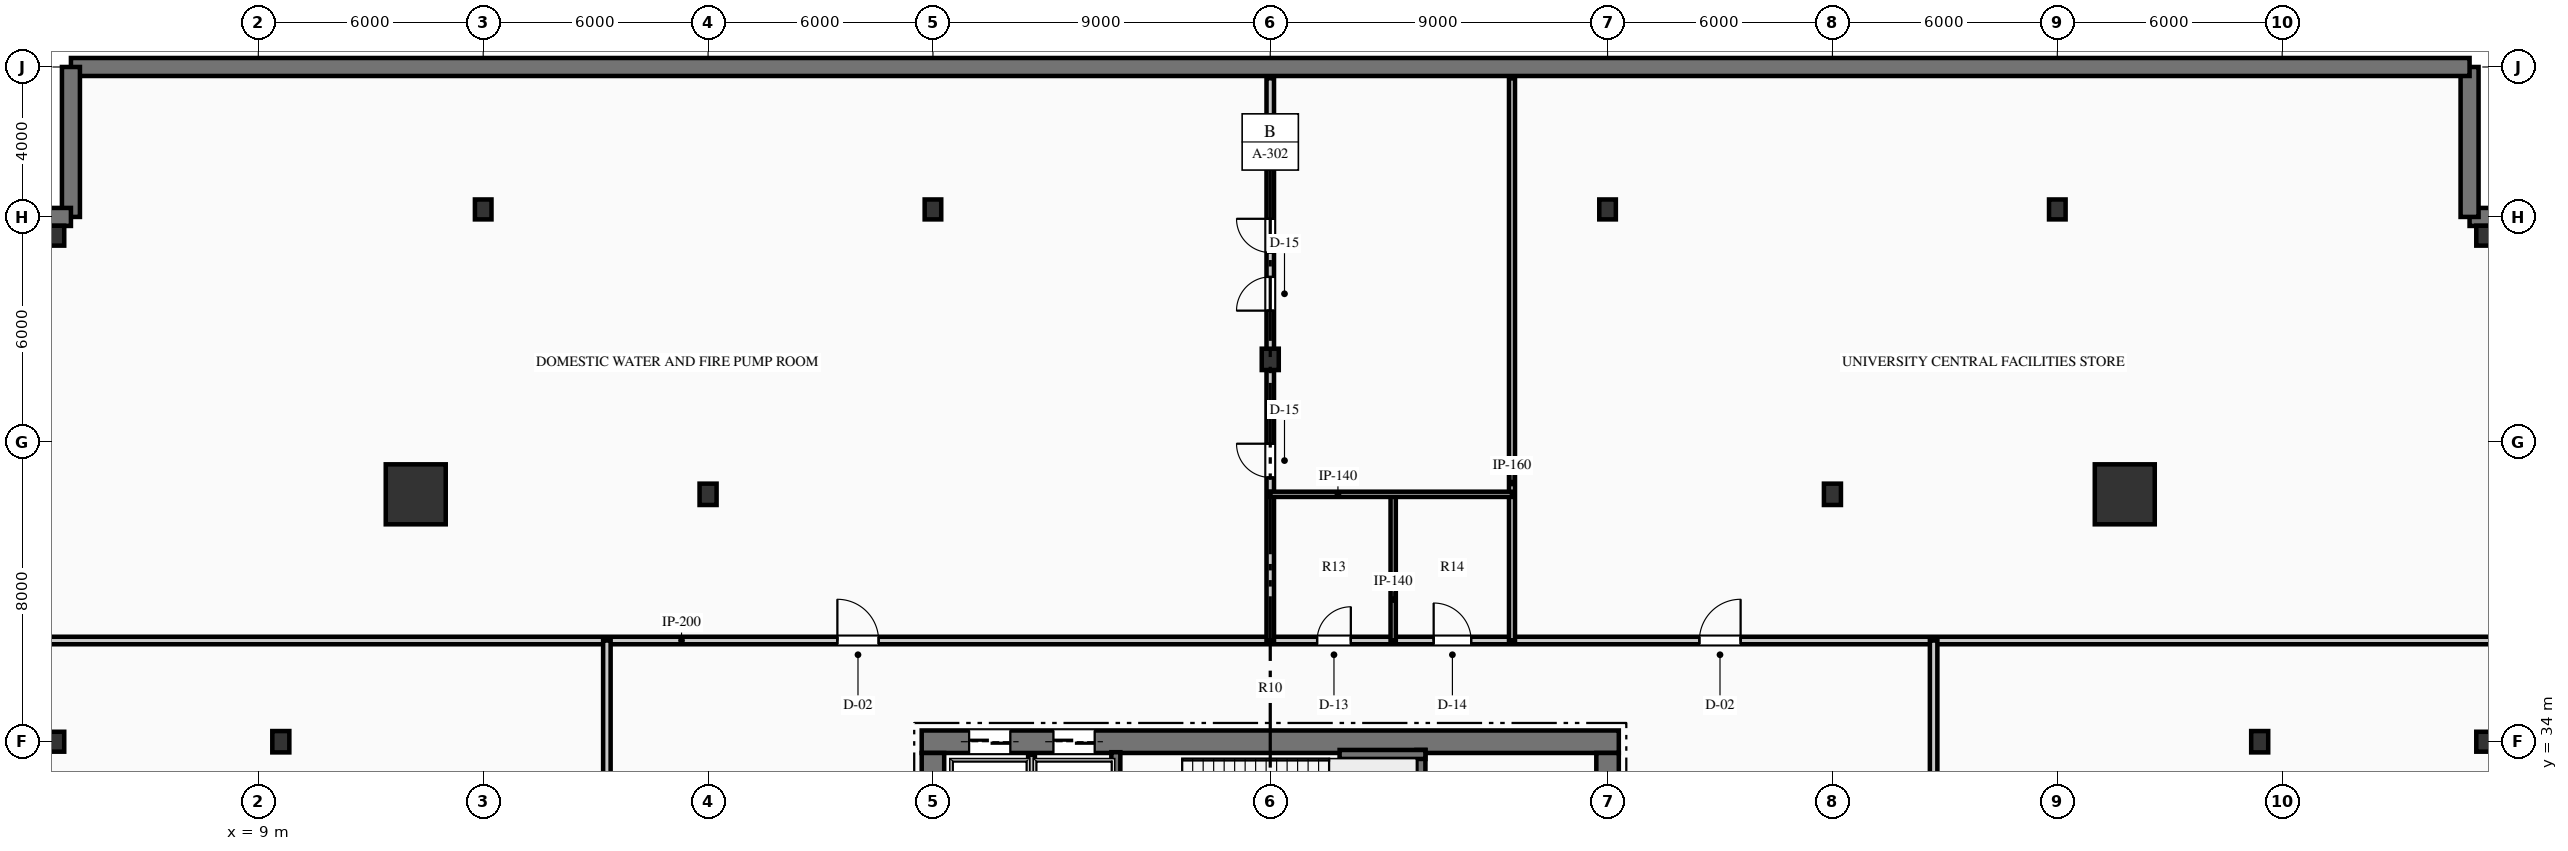
"""IFC4 building model, lengths in metres.
Left out: names, types, materials, properties, quantities, classifications, styles, units other than length and angle.
Written with IfcOpenShell. Run it as: python <this file> out.ifc"""

import sys

from ifc_helpers import new_model, si_unit, direction, frame, frame_2d, origin, origin_2d, place, context, subcontext, project, spatial, rectangle, hollow_rectangle, i_section, extrude, element, fill, save


model = new_model("IFC4")
c1 = context("Model", 3, precision=1e-05, world=origin(), true_north=direction((0.0, 1.0)))
c2 = subcontext(c1, "Body", "Model", "MODEL_VIEW")
j1 = project(units=[si_unit("LENGTHUNIT", "METRE"), si_unit("PLANEANGLEUNIT", "RADIAN")], contexts=[c1])
p1 = place(None, origin())
s1 = spatial("IfcSite", under=j1, at=p1, CompositionType="ELEMENT")
p2 = place(p1, origin())
s2 = spatial("IfcBuilding", under=s1, at=p2, CompositionType="ELEMENT")
p3 = place(p2, frame((0.0, 0.0, -5.2)))
s3 = spatial("IfcBuildingStorey", under=s2, at=p3, CompositionType="ELEMENT", Elevation=-5.2)
p4 = place(p3, frame((26.7, 34.0, -0.3), z_axis=(0.0, 0.0, 1.0), x_axis=(1.0, 0.0, 0.0)))
e1 = element("IfcWall", 1, at=p4, inside=s3, PredefinedType="SHEAR", context=c2, shape_type="SweptSolid", body=[
    extrude(rectangle(XDim=18.6, YDim=0.6, at=frame_2d((9.3, 0.0))), origin(), (0.0, 0.0, 1.0), 5.5),
])
p5 = place(p4, frame((1.265, 0.0, 0.3)))
e2 = element("IfcOpeningElement", 2, at=p5, cuts=e1, PredefinedType="OPENING", context=c2, shape_type="SweptSolid", body=[
    extrude(rectangle(XDim=1.1, YDim=2.15, at=frame_2d((0.55, 1.075))), frame((0.0, 0.31, 0.0), z_axis=(0.0, -1.0, 0.0), x_axis=(1.0, 0.0, 0.0)), (0.0, 0.0, 1.0), 0.62),
])
p6 = place(p4, frame((3.515, 0.0, 0.3)))
e3 = element("IfcOpeningElement", 3, at=p6, cuts=e1, PredefinedType="OPENING", context=c2, shape_type="SweptSolid", body=[
    extrude(rectangle(XDim=1.1, YDim=2.15, at=frame_2d((0.55, 1.075))), frame((0.0, 0.31, 0.0), z_axis=(0.0, -1.0, 0.0), x_axis=(1.0, 0.0, 0.0)), (0.0, 0.0, 1.0), 0.62),
])
p7 = place(p3, frame((27.0, 18.3, -0.3), z_axis=(0.0, 0.0, 1.0), x_axis=(0.0, 1.0, 0.0)))
e4 = element("IfcWall", 4, at=p7, inside=s3, PredefinedType="SHEAR", context=c2, shape_type="SweptSolid", body=[
    extrude(rectangle(XDim=15.4, YDim=0.6, at=frame_2d((7.7, 0.0))), origin(), (0.0, 0.0, 1.0), 5.5),
])
p8 = place(p7, frame((9.94, 0.0, 0.3)))
e5 = element("IfcOpeningElement", 5, at=p8, cuts=e4, PredefinedType="OPENING", context=c2, shape_type="SweptSolid", body=[
    extrude(rectangle(XDim=1.4, YDim=2.2, at=frame_2d((0.7, 1.1))), frame((0.0, 0.31, 0.0), z_axis=(0.0, -1.0, 0.0), x_axis=(1.0, 0.0, 0.0)), (0.0, 0.0, 1.0), 0.62),
])
p9 = place(p3, frame((45.0, 18.3, -0.3), z_axis=(0.0, 0.0, 1.0), x_axis=(0.0, 1.0, 0.0)))
e6 = element("IfcWall", 6, at=p9, inside=s3, PredefinedType="SHEAR", context=c2, shape_type="SweptSolid", body=[
    extrude(rectangle(XDim=15.4, YDim=0.6, at=frame_2d((7.7, 0.0))), origin(), (0.0, 0.0, 1.0), 5.5),
])
p10 = place(p9, frame((9.94, 0.0, 0.3)))
e7 = element("IfcOpeningElement", 7, at=p10, cuts=e6, PredefinedType="OPENING", context=c2, shape_type="SweptSolid", body=[
    extrude(rectangle(XDim=1.4, YDim=2.2, at=frame_2d((0.7, 1.1))), frame((0.0, 0.31, 0.0), z_axis=(0.0, -1.0, 0.0), x_axis=(1.0, 0.0, 0.0)), (0.0, 0.0, 1.0), 0.62),
])
p11 = place(p3, frame((31.88, 29.93, -0.3), z_axis=(0.0, 0.0, 1.0), x_axis=(0.0, 1.0, 0.0)))
e8 = element("IfcWall", 8, at=p11, inside=s3, PredefinedType="SHEAR", context=c2, shape_type="SweptSolid", body=[
    extrude(rectangle(XDim=3.79, YDim=0.24, at=frame_2d((1.895, 0.0))), origin(), (0.0, 0.0, 1.0), 5.5),
])
p12 = place(p3, frame((40.02, 29.93, -0.3), z_axis=(0.0, 0.0, 1.0), x_axis=(0.0, 1.0, 0.0)))
e9 = element("IfcWall", 9, at=p12, inside=s3, PredefinedType="SHEAR", context=c2, shape_type="SweptSolid", body=[
    extrude(rectangle(XDim=3.85, YDim=0.24, at=frame_2d((1.925, 0.0))), origin(), (0.0, 0.0, 1.0), 5.5),
])
p13 = place(p3, frame((37.85, 33.66, -0.3), z_axis=(0.0, 0.0, 1.0), x_axis=(1.0, 0.0, 0.0)))
e10 = element("IfcWall", 10, at=p13, inside=s3, PredefinedType="SHEAR", context=c2, shape_type="SweptSolid", body=[
    extrude(rectangle(XDim=2.29, YDim=0.24, at=frame_2d((1.145, 0.0))), origin(), (0.0, 0.0, 1.0), 5.5),
])
for number, where, z_axis, x_axis in (
    (11, (72.0, 48.0, -0.3), (0.0, 0.0, 1.0), (-1.0, 0.0, 0.0)),
    (12, (68.0, 48.0, -0.3), (0.0, 0.0, 1.0), (0.0, 1.0, 0.0)),
):
    element("IfcWall", number, at=place(p3, frame(where, z_axis=z_axis, x_axis=x_axis)), inside=s3, PredefinedType="SHEAR", context=c2, shape_type="SweptSolid", body=[
        extrude(rectangle(XDim=4.0, YDim=0.48, at=frame_2d((2.0, 0.0))), origin(), (0.0, 0.0, 1.0), 5.5),
    ])
p14 = place(p3, frame((68.0, 52.0, -0.3), z_axis=(0.0, 0.0, 1.0), x_axis=(-1.0, 0.0, 0.0)))
e13 = element("IfcWall", 13, at=p14, inside=s3, PredefinedType="SHEAR", context=c2, shape_type="SweptSolid", body=[
    extrude(rectangle(XDim=64.0, YDim=0.48, at=frame_2d((32.0, 0.0))), origin(), (0.0, 0.0, 1.0), 5.5),
])
for number, where, z_axis, x_axis in (
    (14, (4.0, 52.0, -0.3), (0.0, 0.0, 1.0), (0.0, -1.0, 0.0)),
    (15, (4.0, 48.0, -0.3), (0.0, 0.0, 1.0), (-1.0, 0.0, 0.0)),
):
    element("IfcWall", number, at=place(p3, frame(where, z_axis=z_axis, x_axis=x_axis)), inside=s3, PredefinedType="SHEAR", context=c2, shape_type="SweptSolid", body=[
        extrude(rectangle(XDim=4.0, YDim=0.48, at=frame_2d((2.0, 0.0))), origin(), (0.0, 0.0, 1.0), 5.5),
    ])
for number, where, z_axis, x_axis in (
    (16, (58.8, 40.6, -0.3), (0.0, 0.0, 1.0), (1.0, 0.0, 0.0)),
    (17, (13.2, 40.6, -0.3), (0.0, 0.0, 1.0), (1.0, 0.0, 0.0)),
):
    element("IfcColumn", number, at=place(p3, frame(where, z_axis=z_axis, x_axis=x_axis)), inside=s3, PredefinedType="COLUMN", context=c2, shape_type="SweptSolid", body=[
        extrude(hollow_rectangle(XDim=1.6, YDim=1.6, WallThickness=0.08, at=origin_2d()), origin(), (0.0, 0.0, 1.0), 5.5),
    ])
for number, where, z_axis, x_axis in (
    (18, (9.6, 34.0, -0.3), (0.0, 0.0, 1.0), (1.0, 0.0, 0.0)),
    (19, (62.4, 34.0, -0.3), (0.0, 0.0, 1.0), (1.0, 0.0, 0.0)),
    (20, (21.0, 40.6, -0.3), (0.0, 0.0, 1.0), (1.0, 0.0, 0.0)),
    (21, (51.0, 40.6, -0.3), (0.0, 0.0, 1.0), (1.0, 0.0, 0.0)),
    (22, (36.0, 44.2, -0.3), (0.0, 0.0, 1.0), (1.0, 0.0, 0.0)),
):
    element("IfcColumn", number, at=place(p3, frame(where, z_axis=z_axis, x_axis=x_axis)), inside=s3, PredefinedType="COLUMN", context=c2, shape_type="SweptSolid", body=[
        extrude(i_section(OverallWidth=0.454, OverallDepth=0.569, WebThickness=0.078, FlangeThickness=0.125, at=origin_2d()), origin(), (0.0, 0.0, 1.0), 5.5),
    ])
for number, where, z_axis, x_axis in (
    (23, (3.6, 34.0, -0.3), (0.0, 0.0, 1.0), (1.0, 0.0, 0.0)),
    (24, (3.6, 47.5, -0.3), (0.0, 0.0, 1.0), (1.0, 0.0, 0.0)),
    (25, (68.4, 34.0, -0.3), (0.0, 0.0, 1.0), (1.0, 0.0, 0.0)),
    (26, (68.4, 47.5, -0.3), (0.0, 0.0, 1.0), (1.0, 0.0, 0.0)),
    (27, (57.0, 48.2, -0.3), (0.0, 0.0, 1.0), (1.0, 0.0, 0.0)),
    (28, (45.0, 48.2, -0.3), (0.0, 0.0, 1.0), (1.0, 0.0, 0.0)),
    (29, (27.0, 48.2, -0.3), (0.0, 0.0, 1.0), (1.0, 0.0, 0.0)),
    (30, (15.0, 48.2, -0.3), (0.0, 0.0, 1.0), (1.0, 0.0, 0.0)),
):
    element("IfcColumn", number, at=place(p3, frame(where, z_axis=z_axis, x_axis=x_axis)), inside=s3, PredefinedType="COLUMN", context=c2, shape_type="SweptSolid", body=[
        extrude(i_section(OverallWidth=0.442, OverallDepth=0.531, WebThickness=0.066, FlangeThickness=0.106, at=origin_2d()), origin(), (0.0, 0.0, 1.0), 5.5),
    ])
p15 = place(p3, frame((29.63, 29.9, 0.0), z_axis=(0.0, 0.0, 1.0), x_axis=(0.0, 1.0, 0.0)))
e31 = element("IfcWall", 31, at=p15, inside=s3, PredefinedType="PARTITIONING", context=c2, shape_type="SweptSolid", body=[
    extrude(rectangle(XDim=3.75, YDim=0.18, at=frame_2d((1.875, 0.0))), origin(), (0.0, 0.0, 1.0), 4.84),
])
p16 = place(p3, frame((0.3, 36.7, 0.0), z_axis=(0.0, 0.0, 1.0), x_axis=(1.0, 0.0, 0.0)))
e32 = element("IfcWall", 32, at=p16, inside=s3, PredefinedType="PARTITIONING", context=c2, shape_type="SweptSolid", body=[
    extrude(rectangle(XDim=71.4, YDim=0.2, at=frame_2d((35.7, 0.0))), origin(), (0.0, 0.0, 1.0), 4.84),
])
p17 = place(p16, frame((24.15, 0.0, 0.0)))
e33 = element("IfcOpeningElement", 33, at=p17, cuts=e32, PredefinedType="OPENING", context=c2, shape_type="SweptSolid", body=[
    extrude(rectangle(XDim=1.1, YDim=2.15, at=frame_2d((0.55, 1.075))), frame((0.0, 0.11, 0.0), z_axis=(0.0, -1.0, 0.0), x_axis=(1.0, 0.0, 0.0)), (0.0, 0.0, 1.0), 0.22),
])
p18 = place(p16, frame((36.95, 0.0, 0.0)))
e34 = element("IfcOpeningElement", 34, at=p18, cuts=e32, PredefinedType="OPENING", context=c2, shape_type="SweptSolid", body=[
    extrude(rectangle(XDim=0.9, YDim=2.15, at=frame_2d((0.45, 1.075))), frame((0.0, 0.11, 0.0), z_axis=(0.0, -1.0, 0.0), x_axis=(1.0, 0.0, 0.0)), (0.0, 0.0, 1.0), 0.22),
])
p19 = place(p16, frame((40.06, 0.0, 0.0)))
e35 = element("IfcOpeningElement", 35, at=p19, cuts=e32, PredefinedType="OPENING", context=c2, shape_type="SweptSolid", body=[
    extrude(rectangle(XDim=1.0, YDim=2.15, at=frame_2d((0.5, 1.075))), frame((0.0, 0.11, 0.0), z_axis=(0.0, -1.0, 0.0), x_axis=(1.0, 0.0, 0.0)), (0.0, 0.0, 1.0), 0.22),
])
p20 = place(p16, frame((47.15, 0.0, 0.0)))
e36 = element("IfcOpeningElement", 36, at=p20, cuts=e32, PredefinedType="OPENING", context=c2, shape_type="SweptSolid", body=[
    extrude(rectangle(XDim=1.1, YDim=2.15, at=frame_2d((0.55, 1.075))), frame((0.0, 0.11, 0.0), z_axis=(0.0, -1.0, 0.0), x_axis=(1.0, 0.0, 0.0)), (0.0, 0.0, 1.0), 0.22),
])
for number, where, z_axis, x_axis in (
    (37, (18.3, 30.08, 0.0), (0.0, 0.0, 1.0), (0.0, 1.0, 0.0)),
    (38, (53.7, 30.08, 0.0), (0.0, 0.0, 1.0), (0.0, 1.0, 0.0)),
):
    element("IfcWall", number, at=place(p3, frame(where, z_axis=z_axis, x_axis=x_axis)), inside=s3, PredefinedType="PARTITIONING", context=c2, shape_type="SweptSolid", body=[
        extrude(rectangle(XDim=6.62, YDim=0.2, at=frame_2d((3.31, 0.0))), origin(), (0.0, 0.0, 1.0), 4.84),
    ])
p21 = place(p3, frame((36.0, 36.7, 0.0), z_axis=(0.0, 0.0, 1.0), x_axis=(0.0, 1.0, 0.0)))
e39 = element("IfcWall", 39, at=p21, inside=s3, PredefinedType="PARTITIONING", context=c2, shape_type="SweptSolid", body=[
    extrude(rectangle(XDim=15.0, YDim=0.2, at=frame_2d((7.5, 0.0))), origin(), (0.0, 0.0, 1.0), 3.973),
])
p22 = place(p21, frame((4.35, 0.0, 0.0)))
e40 = element("IfcOpeningElement", 40, at=p22, cuts=e39, PredefinedType="OPENING", context=c2, shape_type="SweptSolid", body=[
    extrude(rectangle(XDim=0.9, YDim=2.05, at=frame_2d((0.45, 1.025))), frame((0.0, 0.11, 0.0), z_axis=(0.0, -1.0, 0.0), x_axis=(1.0, 0.0, 0.0)), (0.0, 0.0, 1.0), 0.22),
])
p23 = place(p21, frame((8.8, 0.0, 0.0)))
e41 = element("IfcOpeningElement", 41, at=p23, cuts=e39, PredefinedType="OPENING", context=c2, shape_type="SweptSolid", body=[
    extrude(rectangle(XDim=0.9, YDim=2.05, at=frame_2d((0.45, 1.025))), frame((0.0, 0.11, 0.0), z_axis=(0.0, -1.0, 0.0), x_axis=(1.0, 0.0, 0.0)), (0.0, 0.0, 1.0), 0.22),
])
p24 = place(p21, frame((10.35, 0.0, 0.0)))
e42 = element("IfcOpeningElement", 42, at=p24, cuts=e39, PredefinedType="OPENING", context=c2, shape_type="SweptSolid", body=[
    extrude(rectangle(XDim=0.9, YDim=2.05, at=frame_2d((0.45, 1.025))), frame((0.0, 0.11, 0.0), z_axis=(0.0, -1.0, 0.0), x_axis=(1.0, 0.0, 0.0)), (0.0, 0.0, 1.0), 0.22),
])
p25 = place(p3, frame((39.28, 36.7, 0.0), z_axis=(0.0, 0.0, 1.0), x_axis=(0.0, 1.0, 0.0)))
e43 = element("IfcWall", 43, at=p25, inside=s3, PredefinedType="PARTITIONING", context=c2, shape_type="SweptSolid", body=[
    extrude(rectangle(XDim=3.9, YDim=0.14, at=frame_2d((1.95, 0.0))), origin(), (0.0, 0.0, 1.0), 4.84),
])
p26 = place(p3, frame((42.45, 36.7, 0.0), z_axis=(0.0, 0.0, 1.0), x_axis=(0.0, 1.0, 0.0)))
e44 = element("IfcWall", 44, at=p26, inside=s3, PredefinedType="PARTITIONING", context=c2, shape_type="SweptSolid", body=[
    extrude(rectangle(XDim=15.0, YDim=0.16, at=frame_2d((7.5, 0.0))), origin(), (0.0, 0.0, 1.0), 4.84),
])
p27 = place(p3, frame((36.0, 40.6, 0.0), z_axis=(0.0, 0.0, 1.0), x_axis=(1.0, 0.0, 0.0)))
e45 = element("IfcWall", 45, at=p27, inside=s3, PredefinedType="PARTITIONING", context=c2, shape_type="SweptSolid", body=[
    extrude(rectangle(XDim=6.45, YDim=0.14, at=frame_2d((3.225, 0.0))), origin(), (0.0, 0.0, 1.0), 4.84),
])
p28 = place(p17, origin())
e46 = element("IfcDoor", 46, at=p28, inside=s3, OperationType="SINGLE_SWING_LEFT", PredefinedType="DOOR", context=c2, shape_type="SweptSolid", body=[
    extrude(rectangle(XDim=1.1, YDim=2.15, at=frame_2d((0.55, 1.075))), frame((0.0, 0.025, 0.0), z_axis=(0.0, -1.0, 0.0), x_axis=(1.0, 0.0, 0.0)), (0.0, 0.0, 1.0), 0.05),
])
fill(e33, e46)
p29 = place(p18, origin())
e47 = element("IfcDoor", 47, at=p29, inside=s3, OperationType="SINGLE_SWING_RIGHT", PredefinedType="DOOR", context=c2, shape_type="SweptSolid", body=[
    extrude(rectangle(XDim=0.9, YDim=2.15, at=frame_2d((0.45, 1.075))), frame((0.0, 0.025, 0.0), z_axis=(0.0, -1.0, 0.0), x_axis=(1.0, 0.0, 0.0)), (0.0, 0.0, 1.0), 0.05),
])
fill(e34, e47)
p30 = place(p19, origin())
e48 = element("IfcDoor", 48, at=p30, inside=s3, OperationType="SINGLE_SWING_LEFT", PredefinedType="DOOR", context=c2, shape_type="SweptSolid", body=[
    extrude(rectangle(XDim=1.0, YDim=2.15, at=frame_2d((0.5, 1.075))), frame((0.0, 0.025, 0.0), z_axis=(0.0, -1.0, 0.0), x_axis=(1.0, 0.0, 0.0)), (0.0, 0.0, 1.0), 0.05),
])
fill(e35, e48)
p31 = place(p20, origin())
e49 = element("IfcDoor", 49, at=p31, inside=s3, OperationType="SINGLE_SWING_RIGHT", PredefinedType="DOOR", context=c2, shape_type="SweptSolid", body=[
    extrude(rectangle(XDim=1.1, YDim=2.15, at=frame_2d((0.55, 1.075))), frame((0.0, 0.025, 0.0), z_axis=(0.0, -1.0, 0.0), x_axis=(1.0, 0.0, 0.0)), (0.0, 0.0, 1.0), 0.05),
])
fill(e36, e49)
p32 = place(p22, origin())
e50 = element("IfcDoor", 50, at=p32, inside=s3, OperationType="SINGLE_SWING_RIGHT", PredefinedType="DOOR", context=c2, shape_type="SweptSolid", body=[
    extrude(rectangle(XDim=0.9, YDim=2.05, at=frame_2d((0.45, 1.025))), frame((0.0, 0.025, 0.0), z_axis=(0.0, -1.0, 0.0), x_axis=(1.0, 0.0, 0.0)), (0.0, 0.0, 1.0), 0.05),
])
fill(e40, e50)
p33 = place(p23, origin())
e51 = element("IfcDoor", 51, at=p33, inside=s3, OperationType="SINGLE_SWING_LEFT", PredefinedType="DOOR", context=c2, shape_type="SweptSolid", body=[
    extrude(rectangle(XDim=0.9, YDim=2.05, at=frame_2d((0.45, 1.025))), frame((0.0, 0.025, 0.0), z_axis=(0.0, -1.0, 0.0), x_axis=(1.0, 0.0, 0.0)), (0.0, 0.0, 1.0), 0.05),
])
fill(e41, e51)
p34 = place(p24, origin())
e52 = element("IfcDoor", 52, at=p34, inside=s3, OperationType="SINGLE_SWING_RIGHT", PredefinedType="DOOR", context=c2, shape_type="SweptSolid", body=[
    extrude(rectangle(XDim=0.9, YDim=2.05, at=frame_2d((0.45, 1.025))), frame((0.0, 0.025, 0.0), z_axis=(0.0, -1.0, 0.0), x_axis=(1.0, 0.0, 0.0)), (0.0, 0.0, 1.0), 0.05),
])
fill(e42, e52)
p35 = place(p5, origin())
e53 = element("IfcDoor", 53, at=p35, inside=s3, OperationType="SLIDING_TO_LEFT", PredefinedType="DOOR", context=c2, shape_type="SweptSolid", body=[
    extrude(rectangle(XDim=1.1, YDim=2.15, at=frame_2d((0.55, 1.075))), frame((0.0, 0.025, 0.0), z_axis=(0.0, -1.0, 0.0), x_axis=(1.0, 0.0, 0.0)), (0.0, 0.0, 1.0), 0.05),
])
fill(e2, e53)
p36 = place(p6, origin())
e54 = element("IfcDoor", 54, at=p36, inside=s3, OperationType="SLIDING_TO_LEFT", PredefinedType="DOOR", context=c2, shape_type="SweptSolid", body=[
    extrude(rectangle(XDim=1.1, YDim=2.15, at=frame_2d((0.55, 1.075))), frame((0.0, 0.025, 0.0), z_axis=(0.0, -1.0, 0.0), x_axis=(1.0, 0.0, 0.0)), (0.0, 0.0, 1.0), 0.05),
])
fill(e3, e54)
save(model, sys.argv[1])
